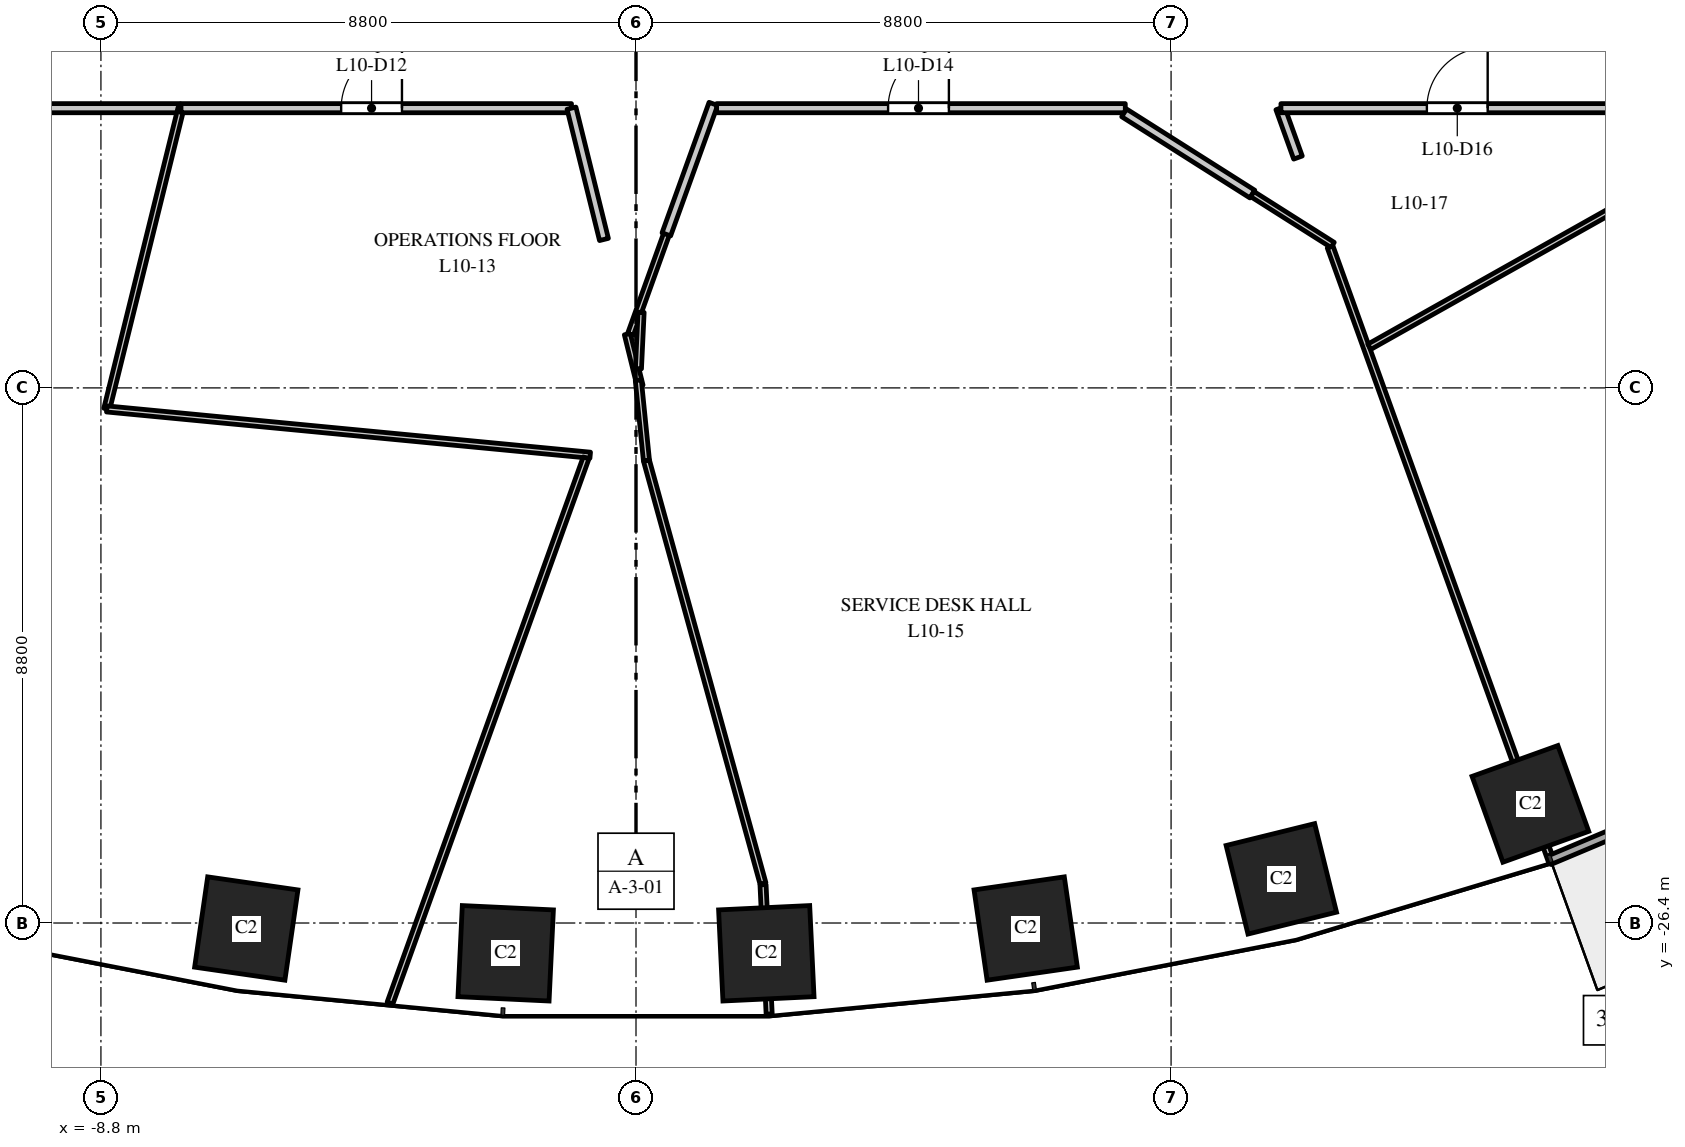
"""IFC4 building model, lengths in metres.
Left out: names, types, materials, properties, quantities, classifications, styles, units other than length and angle.
Written with IfcOpenShell. Run it as: python <this file> out.ifc"""

import sys

from ifc_helpers import new_model, si_unit, direction, frame, frame_2d, origin, origin_2d, place, context, subcontext, project, spatial, rectangle, extrude, element, fill, save


model = new_model("IFC4")
c1 = context("Model", 3, precision=1e-05, world=origin(), true_north=direction((0.0, 1.0)))
c2 = subcontext(c1, "Body", "Model", "MODEL_VIEW")
j1 = project(units=[si_unit("LENGTHUNIT", "METRE"), si_unit("PLANEANGLEUNIT", "RADIAN")], contexts=[c1])
p1 = place(None, origin())
s1 = spatial("IfcSite", under=j1, at=p1, CompositionType="ELEMENT")
p2 = place(p1, origin())
s2 = spatial("IfcBuilding", under=s1, at=p2, CompositionType="ELEMENT")
p3 = place(p2, frame((0.0, 0.0, 50.5)))
s3 = spatial("IfcBuildingStorey", under=s2, at=p3, CompositionType="ELEMENT", Elevation=50.5)
for number, where, z_axis, x_axis in (
    (1, (-6.409, -26.491, 0.0), (0.0, 0.0, 1.0), (0.99, -0.143, 0.0)),
    (2, (-2.143, -26.898, 0.0), (0.0, 0.0, 1.0), (0.999, -0.048, 0.0)),
    (3, (2.143, -26.898, 0.0), (0.0, 0.0, 1.0), (0.999, 0.048, 0.0)),
    (4, (6.409, -26.491, 0.0), (0.0, 0.0, 1.0), (0.99, 0.143, 0.0)),
    (5, (10.613, -25.674, 0.0), (0.0, 0.0, 1.0), (0.971, 0.24, 0.0)),
    (6, (14.709, -24.441, 0.0), (0.0, 0.0, 1.0), (0.941, 0.338, 0.0)),
):
    element("IfcColumn", number, at=place(p3, frame(where, z_axis=z_axis, x_axis=x_axis)), inside=s3, PredefinedType="COLUMN", context=c2, shape_type="SweptSolid", body=[
        extrude(rectangle(XDim=1.5, YDim=1.5, at=origin_2d()), origin(), (0.0, 0.0, 1.0), 4.0),
    ])
p4 = place(p3, frame((15.018, -25.369, 0.0), z_axis=(0.0, 0.0, 1.0), x_axis=(0.921816985161, 0.387625393736, 0.0)))
e7 = element("IfcWall", 7, at=p4, inside=s3, PredefinedType="STANDARD", context=c2, shape_type="SweptSolid", body=[
    extrude(rectangle(XDim=4.426, YDim=0.15, at=frame_2d((2.213, 0.0))), origin(), (0.0, 0.0, 1.0), 3.7),
])
p5 = place(p4, frame((1.713, 0.0, 0.0)))
e8 = element("IfcOpeningElement", 8, at=p5, cuts=e7, PredefinedType="OPENING", context=c2, shape_type="SweptSolid", body=[
    extrude(rectangle(XDim=1.0, YDim=2.4, at=frame_2d((0.5, 1.2))), frame((0.0, 0.085, 0.0), z_axis=(0.0, -1.0, 0.0), x_axis=(1.0, 0.0, 0.0)), (0.0, 0.0, 1.0), 0.17),
])
p6 = place(p3, frame((-16.5, -13.0, 0.0), z_axis=(0.0, 0.0, 1.0), x_axis=(1.0, 0.0, 0.0)))
e9 = element("IfcWall", 9, at=p6, inside=s3, PredefinedType="PARTITIONING", context=c2, shape_type="SweptSolid", body=[
    extrude(rectangle(XDim=9.001, YDim=0.15, at=frame_2d((4.5, 0.0))), origin(), (0.0, 0.0, 1.0), 2.85),
])
p7 = place(p6, frame((3.9, 0.0, 0.0)))
e10 = element("IfcOpeningElement", 10, at=p7, cuts=e9, PredefinedType="OPENING", context=c2, shape_type="SweptSolid", body=[
    extrude(rectangle(XDim=1.0, YDim=2.1, at=frame_2d((0.5, 1.05))), frame((0.0, 0.085, 0.0), z_axis=(0.0, -1.0, 0.0), x_axis=(1.0, 0.0, 0.0)), (0.0, 0.0, 1.0), 0.17),
])
p8 = place(p3, frame((-8.704, -17.946, 0.0), z_axis=(0.0, 0.0, 1.0), x_axis=(0.239704393154, 0.970845921814, 0.0)))
e11 = element("IfcWall", 11, at=p8, inside=s3, PredefinedType="PARTITIONING", context=c2, shape_type="SweptSolid", body=[
    extrude(rectangle(XDim=5.094, YDim=0.1, at=frame_2d((2.547, 0.0))), origin(), (0.0, 0.0, 1.0), 3.7),
])
p9 = place(p3, frame((-8.704, -17.946, 0.0), z_axis=(0.0, 0.0, 1.0), x_axis=(0.995451268437, -0.095272095422, 0.0)))
e12 = element("IfcWall", 12, at=p9, inside=s3, PredefinedType="PARTITIONING", context=c2, shape_type="SweptSolid", body=[
    extrude(rectangle(XDim=7.988, YDim=0.1, at=frame_2d((3.994, 0.0))), origin(), (0.0, 0.0, 1.0), 2.85),
])
p10 = place(p3, frame((-7.483, -13.0, 0.0), z_axis=(0.0, 0.0, 1.0), x_axis=(1.0, 0.0, 0.0)))
e13 = element("IfcWall", 13, at=p10, inside=s3, PredefinedType="PARTITIONING", context=c2, shape_type="SweptSolid", body=[
    extrude(rectangle(XDim=6.422, YDim=0.15, at=frame_2d((3.211, 0.0))), origin(), (0.0, 0.0, 1.0), 2.85),
])
p11 = place(p10, frame((2.634, 0.0, 0.0)))
e14 = element("IfcOpeningElement", 14, at=p11, cuts=e13, PredefinedType="OPENING", context=c2, shape_type="SweptSolid", body=[
    extrude(rectangle(XDim=1.0, YDim=2.1, at=frame_2d((0.5, 1.05))), frame((0.0, 0.085, 0.0), z_axis=(0.0, -1.0, 0.0), x_axis=(1.0, 0.0, 0.0)), (0.0, 0.0, 1.0), 0.17),
])
p12 = place(p3, frame((-4.046, -27.717, 0.0), z_axis=(0.0, 0.0, 1.0), x_axis=(0.338447260677, 0.940985362129, 0.0)))
e15 = element("IfcWall", 15, at=p12, inside=s3, PredefinedType="PARTITIONING", context=c2, shape_type="SweptSolid", body=[
    extrude(rectangle(XDim=9.528, YDim=0.1, at=frame_2d((4.764, 0.0))), origin(), (0.0, 0.0, 1.0), 2.85),
])
p13 = place(p3, frame((-1.061, -13.0, 0.0), z_axis=(0.0, 0.0, 1.0), x_axis=(0.240081023427, -0.9707528533, 0.0)))
e16 = element("IfcWall", 16, at=p13, inside=s3, PredefinedType="PARTITIONING", context=c2, shape_type="SweptSolid", body=[
    extrude(rectangle(XDim=2.224, YDim=0.15, at=frame_2d((1.112, 0.0))), origin(), (0.0, 0.0, 1.0), 2.85),
])
p14 = place(p3, frame((-0.143, -16.715, 0.0), z_axis=(0.0, 0.0, 1.0), x_axis=(0.23958475997, -0.970875451739, 0.0)))
e17 = element("IfcWall", 17, at=p14, inside=s3, PredefinedType="PARTITIONING", context=c2, shape_type="SweptSolid", body=[
    extrude(rectangle(XDim=0.876, YDim=0.1, at=frame_2d((0.438, 0.0))), origin(), (0.0, 0.0, 1.0), 3.7),
])
p15 = place(p3, frame((-0.09, -16.718, 0.0), z_axis=(0.0, 0.0, 1.0), x_axis=(0.3382216124, 0.941066491225, 0.0)))
e18 = element("IfcWall", 18, at=p15, inside=s3, PredefinedType="PARTITIONING", context=c2, shape_type="SweptSolid", body=[
    extrude(rectangle(XDim=1.771, YDim=0.1, at=frame_2d((0.886, 0.0))), origin(), (0.0, 0.0, 1.0), 3.7),
])
p16 = place(p3, frame((0.04, -17.284, 0.0), z_axis=(0.0, 0.0, 1.0), x_axis=(0.047302948177, 0.998880589006, 0.0)))
e19 = element("IfcWall", 19, at=p16, inside=s3, PredefinedType="PARTITIONING", context=c2, shape_type="SweptSolid", body=[
    extrude(rectangle(XDim=0.929, YDim=0.1, at=frame_2d((0.464, 0.0))), origin(), (0.0, 0.0, 1.0), 3.7),
])
p17 = place(p3, frame((0.038, -17.474, 0.0), z_axis=(0.0, 0.0, 1.0), x_axis=(0.100886401076, -0.99489795159, 0.0)))
e20 = element("IfcWall", 20, at=p17, inside=s3, PredefinedType="PARTITIONING", context=c2, shape_type="SweptSolid", body=[
    extrude(rectangle(XDim=1.329, YDim=0.1, at=frame_2d((0.664, 0.0))), origin(), (0.0, 0.0, 1.0), 3.7),
])
p18 = place(p3, frame((0.172, -18.796, 0.0), z_axis=(0.0, 0.0, 1.0), x_axis=(0.265628515821, -0.964075459486, 0.0)))
e21 = element("IfcWall", 21, at=p18, inside=s3, PredefinedType="PARTITIONING", context=c2, shape_type="SweptSolid", body=[
    extrude(rectangle(XDim=7.212, YDim=0.1, at=frame_2d((3.606, 0.0))), origin(), (0.0, 0.0, 1.0), 3.7),
])
p19 = place(p3, frame((0.499, -15.075, 0.0), z_axis=(0.0, 0.0, 1.0), x_axis=(0.338871070746, 0.940832821181, 0.0)))
e22 = element("IfcWall", 22, at=p19, inside=s3, PredefinedType="PARTITIONING", context=c2, shape_type="SweptSolid", body=[
    extrude(rectangle(XDim=2.281, YDim=0.15, at=frame_2d((1.141, 0.0))), origin(), (0.0, 0.0, 1.0), 3.7),
])
p20 = place(p3, frame((1.326, -13.0, 0.0), z_axis=(0.0, 0.0, 1.0), x_axis=(1.0, 0.0, 0.0)))
e23 = element("IfcWall", 23, at=p20, inside=s3, PredefinedType="PARTITIONING", context=c2, shape_type="SweptSolid", body=[
    extrude(rectangle(XDim=6.721, YDim=0.15, at=frame_2d((3.361, 0.0))), origin(), (0.0, 0.0, 1.0), 2.85),
])
p21 = place(p20, frame((2.82, 0.0, 0.0)))
e24 = element("IfcOpeningElement", 24, at=p21, cuts=e23, PredefinedType="OPENING", context=c2, shape_type="SweptSolid", body=[
    extrude(rectangle(XDim=1.0, YDim=2.1, at=frame_2d((0.5, 1.05))), frame((0.0, 0.085, 0.0), z_axis=(0.0, -1.0, 0.0), x_axis=(1.0, 0.0, 0.0)), (0.0, 0.0, 1.0), 0.17),
])
p22 = place(p3, frame((2.089, -25.77, 0.0), z_axis=(0.0, 0.0, 1.0), x_axis=(0.04733101585, -0.99887925944, 0.0)))
e25 = element("IfcWall", 25, at=p22, inside=s3, PredefinedType="PARTITIONING", context=c2, shape_type="SweptSolid", body=[
    extrude(rectangle(XDim=2.13, YDim=0.1, at=frame_2d((1.065, 0.0))), origin(), (0.0, 0.0, 1.0), 2.85),
])
p23 = place(p3, frame((8.028, -13.077, 0.0), z_axis=(0.0, 0.0, 1.0), x_axis=(0.844718865656, -0.53521027457, 0.0)))
e26 = element("IfcWall", 26, at=p23, inside=s3, PredefinedType="PARTITIONING", context=c2, shape_type="SweptSolid", body=[
    extrude(rectangle(XDim=2.497, YDim=0.15, at=frame_2d((1.248, 0.0))), origin(), (0.0, 0.0, 1.0), 3.7),
])
p24 = place(p3, frame((10.137, -14.413, 0.0), z_axis=(0.0, 0.0, 1.0), x_axis=(0.844849680057, -0.535003755228, 0.0)))
e27 = element("IfcWall", 27, at=p24, inside=s3, PredefinedType="PARTITIONING", context=c2, shape_type="SweptSolid", body=[
    extrude(rectangle(XDim=1.562, YDim=0.1, at=frame_2d((0.781, 0.0))), origin(), (0.0, 0.0, 1.0), 3.7),
])
p25 = place(p3, frame((10.595, -13.0, 0.0), z_axis=(0.0, 0.0, 1.0), x_axis=(0.338378813476, -0.941009977944, 0.0)))
e28 = element("IfcWall", 28, at=p25, inside=s3, PredefinedType="PARTITIONING", context=c2, shape_type="SweptSolid", body=[
    extrude(rectangle(XDim=0.863, YDim=0.15, at=frame_2d((0.432, 0.0))), origin(), (0.0, 0.0, 1.0), 3.7),
])
p26 = place(p3, frame((10.607, -13.0, 0.0), z_axis=(0.0, 0.0, 1.0), x_axis=(1.0, 0.0, 0.0)))
e29 = element("IfcWall", 29, at=p26, inside=s3, PredefinedType="PARTITIONING", context=c2, shape_type="SweptSolid", body=[
    extrude(rectangle(XDim=5.893, YDim=0.15, at=frame_2d((2.947, 0.0))), origin(), (0.0, 0.0, 1.0), 3.7),
])
p27 = place(p26, frame((2.4, 0.0, 0.0)))
e30 = element("IfcOpeningElement", 30, at=p27, cuts=e29, PredefinedType="OPENING", context=c2, shape_type="SweptSolid", body=[
    extrude(rectangle(XDim=1.0, YDim=2.1, at=frame_2d((0.5, 1.05))), frame((0.0, 0.085, 0.0), z_axis=(0.0, -1.0, 0.0), x_axis=(1.0, 0.0, 0.0)), (0.0, 0.0, 1.0), 0.17),
])
p28 = place(p3, frame((11.416, -15.282, 0.0), z_axis=(0.0, 0.0, 1.0), x_axis=(0.338824973611, -0.940849423265, 0.0)))
e31 = element("IfcWall", 31, at=p28, inside=s3, PredefinedType="PARTITIONING", context=c2, shape_type="SweptSolid", body=[
    extrude(rectangle(XDim=10.734, YDim=0.1, at=frame_2d((5.367, 0.0))), origin(), (0.0, 0.0, 1.0), 3.7),
])
p29 = place(p3, frame((12.06, -16.924, 0.0), z_axis=(0.0, 0.0, 1.0), x_axis=(0.871521837039, 0.490356694218, 0.0)))
e32 = element("IfcWall", 32, at=p29, inside=s3, PredefinedType="PARTITIONING", context=c2, shape_type="SweptSolid", body=[
    extrude(rectangle(XDim=9.836, YDim=0.1, at=frame_2d((4.918, 0.0))), origin(), (0.0, 0.0, 1.0), 3.7),
])
p30 = place(p11, origin())
e33 = element("IfcDoor", 33, at=p30, inside=s3, OperationType="SINGLE_SWING_RIGHT", PredefinedType="DOOR", context=c2, shape_type="SweptSolid", body=[
    extrude(rectangle(XDim=1.0, YDim=2.1, at=frame_2d((0.5, 1.05))), frame((0.0, 0.025, 0.0), z_axis=(0.0, -1.0, 0.0), x_axis=(1.0, 0.0, 0.0)), (0.0, 0.0, 1.0), 0.05),
])
fill(e14, e33)
p31 = place(p21, origin())
e34 = element("IfcDoor", 34, at=p31, inside=s3, OperationType="SINGLE_SWING_RIGHT", PredefinedType="DOOR", context=c2, shape_type="SweptSolid", body=[
    extrude(rectangle(XDim=1.0, YDim=2.1, at=frame_2d((0.5, 1.05))), frame((0.0, 0.025, 0.0), z_axis=(0.0, -1.0, 0.0), x_axis=(1.0, 0.0, 0.0)), (0.0, 0.0, 1.0), 0.05),
])
fill(e24, e34)
p32 = place(p27, origin())
e35 = element("IfcDoor", 35, at=p32, inside=s3, OperationType="SINGLE_SWING_RIGHT", PredefinedType="DOOR", context=c2, shape_type="SweptSolid", body=[
    extrude(rectangle(XDim=1.0, YDim=2.1, at=frame_2d((0.5, 1.05))), frame((0.0, 0.025, 0.0), z_axis=(0.0, -1.0, 0.0), x_axis=(1.0, 0.0, 0.0)), (0.0, 0.0, 1.0), 0.05),
])
fill(e30, e35)
save(model, sys.argv[1])
